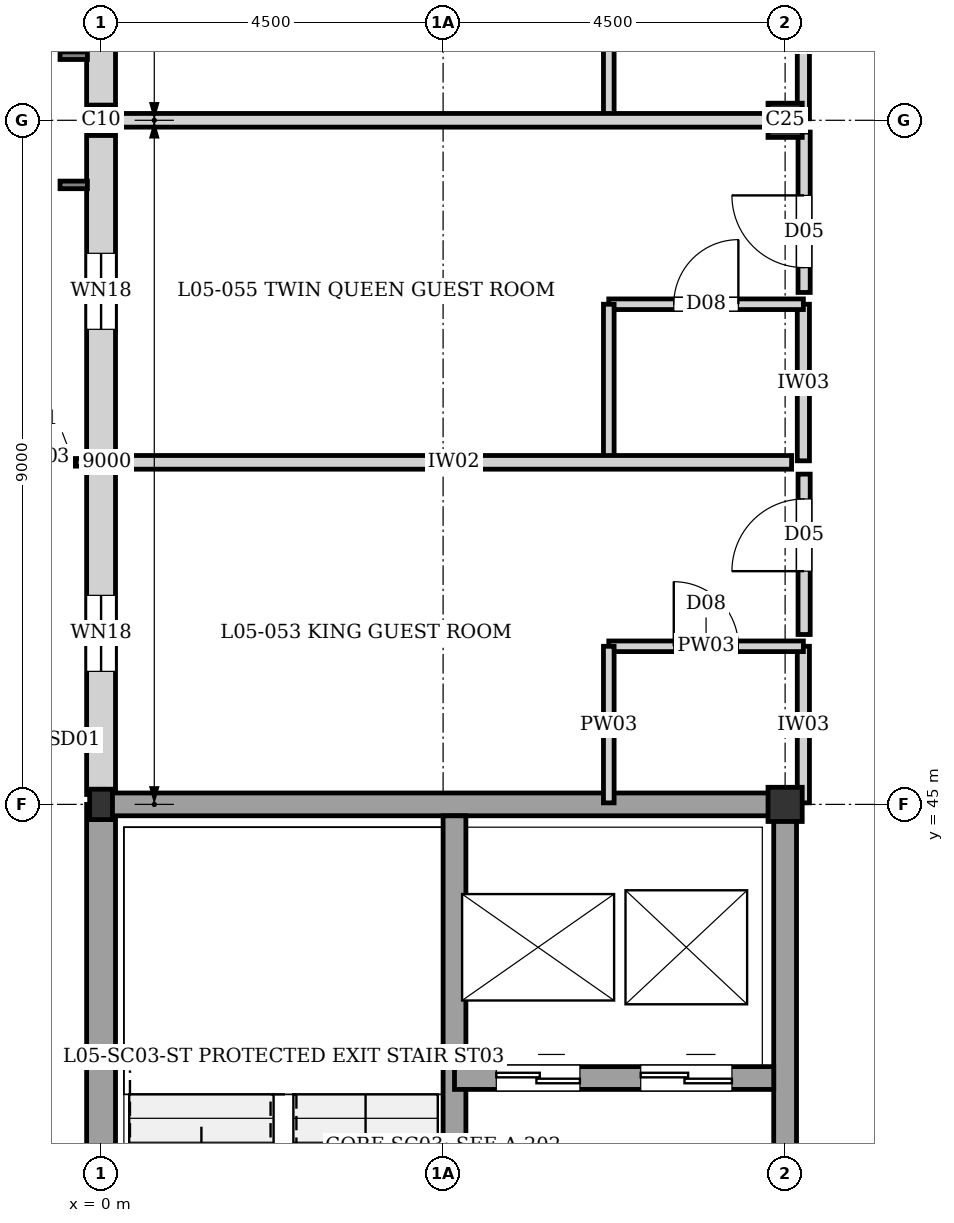
"""IFC4 building model, lengths in metres.
Left out: names, types, materials, properties, quantities, classifications, styles, units other than length and angle.
Written with IfcOpenShell. Run it as: python <this file> out.ifc"""

import sys

from ifc_helpers import new_model, si_unit, direction, frame, frame_2d, origin, origin_2d, place, context, subcontext, project, spatial, rectangle, i_section, extrude, element, fill, save


model = new_model("IFC4")
c1 = context("Model", 3, precision=1e-05, world=origin(), true_north=direction((0.0, 1.0)))
c2 = subcontext(c1, "Body", "Model", "MODEL_VIEW")
j1 = project(units=[si_unit("LENGTHUNIT", "METRE"), si_unit("PLANEANGLEUNIT", "RADIAN")], contexts=[c1])
p1 = place(None, origin())
s1 = spatial("IfcSite", under=j1, at=p1, CompositionType="ELEMENT")
p2 = place(p1, origin())
s2 = spatial("IfcBuilding", under=s1, at=p2, CompositionType="ELEMENT")
p3 = place(p2, frame((0.0, 0.0, 17.6)))
s3 = spatial("IfcBuildingStorey", under=s2, at=p3, CompositionType="ELEMENT", Elevation=17.6)
for number, where, z_axis, x_axis in (
    (1, (0.0, 45.0, 0.0), (0.0, 0.0, 1.0), (1.0, 0.0, 0.0)),
    (2, (0.0, 54.0, 0.0), (0.0, 0.0, 1.0), (1.0, 0.0, 0.0)),
):
    element("IfcColumn", number, at=place(p3, frame(where, z_axis=z_axis, x_axis=x_axis)), inside=s3, PredefinedType="COLUMN", context=c2, shape_type="SweptSolid", body=[
        extrude(i_section(OverallWidth=0.3, OverallDepth=0.4, WebThickness=0.013, FlangeThickness=0.024, at=origin_2d()), origin(), (0.0, 0.0, 1.0), 3.04),
    ])
for number, where, z_axis, x_axis in (
    (3, (9.0, 45.0, 0.0), (0.0, 0.0, 1.0), (1.0, 0.0, 0.0)),
    (4, (9.0, 54.0, 0.0), (0.0, 0.0, 1.0), (1.0, 0.0, 0.0)),
):
    element("IfcColumn", number, at=place(p3, frame(where, z_axis=z_axis, x_axis=x_axis)), inside=s3, PredefinedType="COLUMN", context=c2, shape_type="SweptSolid", body=[
        extrude(rectangle(XDim=0.45, YDim=0.45, at=origin_2d()), origin(), (0.0, 0.0, 1.0), 3.04),
    ])
p4 = place(p3, frame((0.0, 36.0, 0.0), z_axis=(0.0, 0.0, 1.0), x_axis=(0.0, 1.0, 0.0)))
e5 = element("IfcWall", 5, at=p4, inside=s3, PredefinedType="SOLIDWALL", context=c2, shape_type="SweptSolid", body=[
    extrude(rectangle(XDim=9.0, YDim=0.38, at=frame_2d((4.5, 0.0))), origin(), (0.0, 0.0, 1.0), 2.82),
])
p5 = place(p3, frame((0.0, 45.13, 0.0), z_axis=(0.0, 0.0, 1.0), x_axis=(0.0, 1.0, 0.0)))
e6 = element("IfcWall", 6, at=p5, inside=s3, PredefinedType="SOLIDWALL", context=c2, shape_type="SweptSolid", body=[
    extrude(rectangle(XDim=8.87, YDim=0.38, at=frame_2d((4.435, 0.0))), origin(), (0.0, 0.0, 1.0), 2.48),
])
p6 = place(p5, frame((1.62, 0.0, 0.35)))
e7 = element("IfcOpeningElement", 7, at=p6, cuts=e6, PredefinedType="OPENING", context=c2, shape_type="SweptSolid", body=[
    extrude(rectangle(XDim=1.0, YDim=1.6, at=frame_2d((0.5, 0.8))), frame((0.0, 0.2, 0.0), z_axis=(0.0, -1.0, 0.0), x_axis=(1.0, 0.0, 0.0)), (0.0, 0.0, 1.0), 0.4),
])
p7 = place(p5, frame((6.12, 0.0, 0.35)))
e8 = element("IfcOpeningElement", 8, at=p7, cuts=e6, PredefinedType="OPENING", context=c2, shape_type="SweptSolid", body=[
    extrude(rectangle(XDim=1.0, YDim=1.6, at=frame_2d((0.5, 0.8))), frame((0.0, 0.2, 0.0), z_axis=(0.0, -1.0, 0.0), x_axis=(1.0, 0.0, 0.0)), (0.0, 0.0, 1.0), 0.4),
])
p8 = place(p3, frame((0.0, 54.0, 0.0), z_axis=(0.0, 0.0, 1.0), x_axis=(0.0, 1.0, 0.0)))
e9 = element("IfcWall", 9, at=p8, inside=s3, PredefinedType="SOLIDWALL", context=c2, shape_type="SweptSolid", body=[
    extrude(rectangle(XDim=9.0, YDim=0.38, at=frame_2d((4.5, 0.0))), origin(), (0.0, 0.0, 1.0), 2.42),
])
p9 = place(p8, frame((1.75, 0.0, 0.35)))
e10 = element("IfcOpeningElement", 10, at=p9, cuts=e9, PredefinedType="OPENING", context=c2, shape_type="SweptSolid", body=[
    extrude(rectangle(XDim=1.0, YDim=1.6, at=frame_2d((0.5, 0.8))), frame((0.0, 0.2, 0.0), z_axis=(0.0, -1.0, 0.0), x_axis=(1.0, 0.0, 0.0)), (0.0, 0.0, 1.0), 0.4),
])
p10 = place(p8, frame((6.25, 0.0, 0.35)))
e11 = element("IfcOpeningElement", 11, at=p10, cuts=e9, PredefinedType="OPENING", context=c2, shape_type="SweptSolid", body=[
    extrude(rectangle(XDim=1.0, YDim=1.6, at=frame_2d((0.5, 0.8))), frame((0.0, 0.2, 0.0), z_axis=(0.0, -1.0, 0.0), x_axis=(1.0, 0.0, 0.0)), (0.0, 0.0, 1.0), 0.4),
])
p11 = place(p3, frame((9.0, 36.0, 0.0), z_axis=(0.0, 0.0, 1.0), x_axis=(0.0, 1.0, 0.0)))
e12 = element("IfcWall", 12, at=p11, inside=s3, PredefinedType="SHEAR", context=c2, shape_type="SweptSolid", body=[
    extrude(rectangle(XDim=9.0, YDim=0.3, at=frame_2d((4.5, 0.0))), origin(), (0.0, 0.0, 1.0), 2.82),
])
p12 = place(p11, frame((2.05, 0.0, 0.0)))
e13 = element("IfcOpeningElement", 13, at=p12, cuts=e12, PredefinedType="OPENING", context=c2, shape_type="SweptSolid", body=[
    extrude(rectangle(XDim=1.4, YDim=2.02, at=frame_2d((0.7, 1.01))), frame((0.0, 0.16, 0.0), z_axis=(0.0, -1.0, 0.0), x_axis=(1.0, 0.0, 0.0)), (0.0, 0.0, 1.0), 0.32),
])
p13 = place(p3, frame((0.0, 45.0, 0.0), z_axis=(0.0, 0.0, 1.0), x_axis=(1.0, 0.0, 0.0)))
e14 = element("IfcWall", 14, at=p13, inside=s3, PredefinedType="SHEAR", context=c2, shape_type="SweptSolid", body=[
    extrude(rectangle(XDim=9.0, YDim=0.3, at=frame_2d((4.5, 0.0))), origin(), (0.0, 0.0, 1.0), 2.82),
])
p14 = place(p3, frame((4.65, 36.15, 0.0), z_axis=(0.0, 0.0, 1.0), x_axis=(0.0, 1.0, 0.0)))
e15 = element("IfcWall", 15, at=p14, inside=s3, PredefinedType="SHEAR", context=c2, shape_type="SweptSolid", body=[
    extrude(rectangle(XDim=8.7, YDim=0.3, at=frame_2d((4.35, 0.0))), origin(), (0.0, 0.0, 1.0), 2.82),
])
p15 = place(p14, frame((0.35, 0.0, 0.0)))
e16 = element("IfcOpeningElement", 16, at=p15, cuts=e15, PredefinedType="OPENING", context=c2, shape_type="SweptSolid", body=[
    extrude(rectangle(XDim=1.4, YDim=2.02, at=frame_2d((0.7, 1.01))), frame((0.0, 0.16, 0.0), z_axis=(0.0, -1.0, 0.0), x_axis=(1.0, 0.0, 0.0)), (0.0, 0.0, 1.0), 0.32),
])
p16 = place(p3, frame((4.65, 41.4, 0.0), z_axis=(0.0, 0.0, 1.0), x_axis=(1.0, 0.0, 0.0)))
e17 = element("IfcWall", 17, at=p16, inside=s3, PredefinedType="SHEAR", context=c2, shape_type="SweptSolid", body=[
    extrude(rectangle(XDim=4.2, YDim=0.3, at=frame_2d((2.1, 0.0))), origin(), (0.0, 0.0, 1.0), 2.82),
])
p17 = place(p16, frame((0.55, 0.0, 0.0)))
e18 = element("IfcOpeningElement", 18, at=p17, cuts=e17, PredefinedType="OPENING", context=c2, shape_type="SweptSolid", body=[
    extrude(rectangle(XDim=1.1, YDim=2.1, at=frame_2d((0.55, 1.05))), frame((0.0, 0.16, 0.0), z_axis=(0.0, -1.0, 0.0), x_axis=(1.0, 0.0, 0.0)), (0.0, 0.0, 1.0), 0.32),
])
p18 = place(p16, frame((2.45, 0.0, 0.0)))
e19 = element("IfcOpeningElement", 19, at=p18, cuts=e17, PredefinedType="OPENING", context=c2, shape_type="SweptSolid", body=[
    extrude(rectangle(XDim=1.2, YDim=2.2, at=frame_2d((0.6, 1.1))), frame((0.0, 0.16, 0.0), z_axis=(0.0, -1.0, 0.0), x_axis=(1.0, 0.0, 0.0)), (0.0, 0.0, 1.0), 0.32),
])
p19 = place(p3, frame((9.24, 45.02, 0.0), z_axis=(0.0, 0.0, 1.0), x_axis=(0.0, 1.0, 0.0)))
e20 = element("IfcWall", 20, at=p19, inside=s3, PredefinedType="PARTITIONING", context=c2, shape_type="SweptSolid", body=[
    extrude(rectangle(XDim=2.06, YDim=0.16, at=frame_2d((1.03, 0.0))), origin(), (0.0, 0.0, 1.0), 2.82),
])
p20 = place(p3, frame((6.68, 47.08, 0.0), z_axis=(0.0, 0.0, 1.0), x_axis=(1.0, 0.0, 0.0)))
e21 = element("IfcWall", 21, at=p20, inside=s3, PredefinedType="PLUMBINGWALL", context=c2, shape_type="SweptSolid", body=[
    extrude(rectangle(XDim=2.56, YDim=0.14, at=frame_2d((1.28, 0.0))), origin(), (0.0, 0.0, 1.0), 2.82),
])
p21 = place(p20, frame((0.855, 0.0, 0.0)))
e22 = element("IfcOpeningElement", 22, at=p21, cuts=e21, PredefinedType="OPENING", context=c2, shape_type="SweptSolid", body=[
    extrude(rectangle(XDim=0.85, YDim=2.04, at=frame_2d((0.425, 1.02))), frame((0.0, 0.08, 0.0), z_axis=(0.0, -1.0, 0.0), x_axis=(1.0, 0.0, 0.0)), (0.0, 0.0, 1.0), 0.16),
])
p22 = place(p3, frame((6.68, 45.02, 0.0), z_axis=(0.0, 0.0, 1.0), x_axis=(0.0, 1.0, 0.0)))
e23 = element("IfcWall", 23, at=p22, inside=s3, PredefinedType="PLUMBINGWALL", context=c2, shape_type="SweptSolid", body=[
    extrude(rectangle(XDim=2.06, YDim=0.14, at=frame_2d((1.03, 0.0))), origin(), (0.0, 0.0, 1.0), 2.82),
])
p23 = place(p3, frame((9.24, 49.52, 0.0), z_axis=(0.0, 0.0, 1.0), x_axis=(0.0, 1.0, 0.0)))
e24 = element("IfcWall", 24, at=p23, inside=s3, PredefinedType="PARTITIONING", context=c2, shape_type="SweptSolid", body=[
    extrude(rectangle(XDim=2.06, YDim=0.16, at=frame_2d((1.03, 0.0))), origin(), (0.0, 0.0, 1.0), 2.82),
])
p24 = place(p3, frame((6.68, 51.58, 0.0), z_axis=(0.0, 0.0, 1.0), x_axis=(1.0, 0.0, 0.0)))
e25 = element("IfcWall", 25, at=p24, inside=s3, PredefinedType="PLUMBINGWALL", context=c2, shape_type="SweptSolid", body=[
    extrude(rectangle(XDim=2.56, YDim=0.14, at=frame_2d((1.28, 0.0))), origin(), (0.0, 0.0, 1.0), 2.82),
])
p25 = place(p24, frame((0.855, 0.0, 0.0)))
e26 = element("IfcOpeningElement", 26, at=p25, cuts=e25, PredefinedType="OPENING", context=c2, shape_type="SweptSolid", body=[
    extrude(rectangle(XDim=0.85, YDim=2.04, at=frame_2d((0.425, 1.02))), frame((0.0, 0.08, 0.0), z_axis=(0.0, -1.0, 0.0), x_axis=(1.0, 0.0, 0.0)), (0.0, 0.0, 1.0), 0.16),
])
p26 = place(p3, frame((6.68, 49.52, 0.0), z_axis=(0.0, 0.0, 1.0), x_axis=(0.0, 1.0, 0.0)))
e27 = element("IfcWall", 27, at=p26, inside=s3, PredefinedType="PLUMBINGWALL", context=c2, shape_type="SweptSolid", body=[
    extrude(rectangle(XDim=2.06, YDim=0.14, at=frame_2d((1.03, 0.0))), origin(), (0.0, 0.0, 1.0), 2.82),
])
p27 = place(p3, frame((9.24, 54.02, 0.0), z_axis=(0.0, 0.0, 1.0), x_axis=(0.0, 1.0, 0.0)))
e28 = element("IfcWall", 28, at=p27, inside=s3, PredefinedType="PARTITIONING", context=c2, shape_type="SweptSolid", body=[
    extrude(rectangle(XDim=2.06, YDim=0.16, at=frame_2d((1.03, 0.0))), origin(), (0.0, 0.0, 1.0), 2.82),
])
p28 = place(p3, frame((6.68, 54.02, 0.0), z_axis=(0.0, 0.0, 1.0), x_axis=(0.0, 1.0, 0.0)))
e29 = element("IfcWall", 29, at=p28, inside=s3, PredefinedType="PLUMBINGWALL", context=c2, shape_type="SweptSolid", body=[
    extrude(rectangle(XDim=2.06, YDim=0.14, at=frame_2d((1.03, 0.0))), origin(), (0.0, 0.0, 1.0), 2.82),
])
p29 = place(p3, frame((0.195, 49.5, 0.0), z_axis=(0.0, 0.0, 1.0), x_axis=(1.0, 0.0, 0.0)))
e30 = element("IfcWall", 30, at=p29, inside=s3, PredefinedType="PARTITIONING", context=c2, shape_type="SweptSolid", body=[
    extrude(rectangle(XDim=8.89, YDim=0.18, at=frame_2d((4.445, 0.0))), origin(), (0.0, 0.0, 1.0), 2.82),
])
p30 = place(p3, frame((0.195, 54.0, 0.0), z_axis=(0.0, 0.0, 1.0), x_axis=(1.0, 0.0, 0.0)))
e31 = element("IfcWall", 31, at=p30, inside=s3, PredefinedType="PARTITIONING", context=c2, shape_type="SweptSolid", body=[
    extrude(rectangle(XDim=8.89, YDim=0.18, at=frame_2d((4.445, 0.0))), origin(), (0.0, 0.0, 1.0), 2.38),
])
p31 = place(p3, frame((9.25, 47.235, 0.0), z_axis=(0.0, 0.0, 1.0), x_axis=(0.0, 1.0, 0.0)))
e32 = element("IfcWall", 32, at=p31, inside=s3, PredefinedType="PARTITIONING", context=c2, shape_type="SweptSolid", body=[
    extrude(rectangle(XDim=2.11, YDim=0.16, at=frame_2d((1.055, 0.0))), origin(), (0.0, 0.0, 1.0), 2.82),
])
p32 = place(p31, frame((0.833, 0.0, 0.0)))
e33 = element("IfcOpeningElement", 33, at=p32, cuts=e32, PredefinedType="OPENING", context=c2, shape_type="SweptSolid", body=[
    extrude(rectangle(XDim=0.95, YDim=2.15, at=frame_2d((0.475, 1.075))), frame((0.0, 0.09, 0.0), z_axis=(0.0, -1.0, 0.0), x_axis=(1.0, 0.0, 0.0)), (0.0, 0.0, 1.0), 0.18),
])
p33 = place(p3, frame((9.25, 51.735, 0.0), z_axis=(0.0, 0.0, 1.0), x_axis=(0.0, 1.0, 0.0)))
e34 = element("IfcWall", 34, at=p33, inside=s3, PredefinedType="PARTITIONING", context=c2, shape_type="SweptSolid", body=[
    extrude(rectangle(XDim=2.11, YDim=0.16, at=frame_2d((1.055, 0.0))), origin(), (0.0, 0.0, 1.0), 2.82),
])
p34 = place(p33, frame((0.327, 0.0, 0.0)))
e35 = element("IfcOpeningElement", 35, at=p34, cuts=e34, PredefinedType="OPENING", context=c2, shape_type="SweptSolid", body=[
    extrude(rectangle(XDim=0.95, YDim=2.15, at=frame_2d((0.475, 1.075))), frame((0.0, 0.09, 0.0), z_axis=(0.0, -1.0, 0.0), x_axis=(1.0, 0.0, 0.0)), (0.0, 0.0, 1.0), 0.18),
])
p35 = place(p6, origin())
e36 = element("IfcWindow", 36, at=p35, inside=s3, PartitioningType="SINGLE_PANEL", PredefinedType="WINDOW", context=c2, shape_type="SweptSolid", body=[
    extrude(rectangle(XDim=1.0, YDim=1.6, at=frame_2d((0.5, 0.8))), frame((0.0, 0.03, 0.0), z_axis=(0.0, -1.0, 0.0), x_axis=(1.0, 0.0, 0.0)), (0.0, 0.0, 1.0), 0.06),
])
fill(e7, e36)
p36 = place(p7, origin())
e37 = element("IfcWindow", 37, at=p36, inside=s3, PartitioningType="SINGLE_PANEL", PredefinedType="WINDOW", context=c2, shape_type="SweptSolid", body=[
    extrude(rectangle(XDim=1.0, YDim=1.6, at=frame_2d((0.5, 0.8))), frame((0.0, 0.03, 0.0), z_axis=(0.0, -1.0, 0.0), x_axis=(1.0, 0.0, 0.0)), (0.0, 0.0, 1.0), 0.06),
])
fill(e8, e37)
p37 = place(p17, origin())
e38 = element("IfcDoor", 38, at=p37, inside=s3, OperationType="DOUBLE_DOOR_SLIDING", PredefinedType="DOOR", context=c2, shape_type="SweptSolid", body=[
    extrude(rectangle(XDim=1.1, YDim=2.1, at=frame_2d((0.55, 1.05))), frame((0.0, 0.025, 0.0), z_axis=(0.0, -1.0, 0.0), x_axis=(1.0, 0.0, 0.0)), (0.0, 0.0, 1.0), 0.05),
])
fill(e18, e38)
p38 = place(p18, origin())
e39 = element("IfcDoor", 39, at=p38, inside=s3, OperationType="DOUBLE_DOOR_SLIDING", PredefinedType="DOOR", context=c2, shape_type="SweptSolid", body=[
    extrude(rectangle(XDim=1.2, YDim=2.2, at=frame_2d((0.6, 1.1))), frame((0.0, 0.025, 0.0), z_axis=(0.0, -1.0, 0.0), x_axis=(1.0, 0.0, 0.0)), (0.0, 0.0, 1.0), 0.05),
])
fill(e19, e39)
p39 = place(p21, origin())
e40 = element("IfcDoor", 40, at=p39, inside=s3, OperationType="SINGLE_SWING_LEFT", PredefinedType="DOOR", context=c2, shape_type="SweptSolid", body=[
    extrude(rectangle(XDim=0.85, YDim=2.04, at=frame_2d((0.425, 1.02))), frame((0.0, 0.025, 0.0), z_axis=(0.0, -1.0, 0.0), x_axis=(1.0, 0.0, 0.0)), (0.0, 0.0, 1.0), 0.05),
])
fill(e22, e40)
p40 = place(p25, origin())
e41 = element("IfcDoor", 41, at=p40, inside=s3, OperationType="SINGLE_SWING_RIGHT", PredefinedType="DOOR", context=c2, shape_type="SweptSolid", body=[
    extrude(rectangle(XDim=0.85, YDim=2.04, at=frame_2d((0.425, 1.02))), frame((0.0, 0.025, 0.0), z_axis=(0.0, -1.0, 0.0), x_axis=(1.0, 0.0, 0.0)), (0.0, 0.0, 1.0), 0.05),
])
fill(e26, e41)
p41 = place(p32, origin())
e42 = element("IfcDoor", 42, at=p41, inside=s3, OperationType="SINGLE_SWING_LEFT", PredefinedType="DOOR", context=c2, shape_type="SweptSolid", body=[
    extrude(rectangle(XDim=0.95, YDim=2.15, at=frame_2d((0.475, 1.075))), frame((0.0, 0.025, 0.0), z_axis=(0.0, -1.0, 0.0), x_axis=(1.0, 0.0, 0.0)), (0.0, 0.0, 1.0), 0.05),
])
fill(e33, e42)
p42 = place(p34, origin())
e43 = element("IfcDoor", 43, at=p42, inside=s3, OperationType="SINGLE_SWING_RIGHT", PredefinedType="DOOR", context=c2, shape_type="SweptSolid", body=[
    extrude(rectangle(XDim=0.95, YDim=2.15, at=frame_2d((0.475, 1.075))), frame((0.0, 0.025, 0.0), z_axis=(0.0, -1.0, 0.0), x_axis=(1.0, 0.0, 0.0)), (0.0, 0.0, 1.0), 0.05),
])
fill(e35, e43)
save(model, sys.argv[1])
